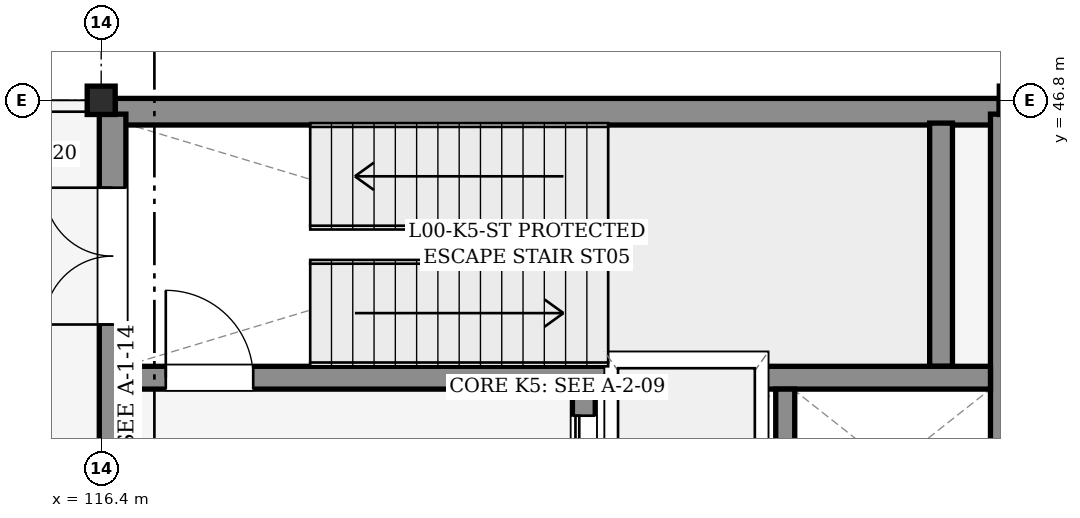
"""IFC4 building model, lengths in metres.
Left out: names, types, materials, properties, quantities, classifications, styles, units other than length and angle.
Written with IfcOpenShell. Run it as: python <this file> out.ifc"""

import sys

from ifc_helpers import new_model, si_unit, direction, frame, frame_2d, origin, origin_2d, place, context, subcontext, project, spatial, rectangle, i_section, extrude, element, fill, save


model = new_model("IFC4")
c1 = context("Model", 3, precision=1e-05, world=origin(), true_north=direction((0.0, 1.0)))
c2 = subcontext(c1, "Body", "Model", "MODEL_VIEW")
j1 = project(units=[si_unit("LENGTHUNIT", "METRE"), si_unit("PLANEANGLEUNIT", "RADIAN")], contexts=[c1])
p1 = place(None, origin())
s1 = spatial("IfcSite", under=j1, at=p1, CompositionType="ELEMENT")
p2 = place(p1, origin())
s2 = spatial("IfcBuilding", under=s1, at=p2, CompositionType="ELEMENT")
p3 = place(p2, origin())
s3 = spatial("IfcBuildingStorey", under=s2, at=p3, CompositionType="ELEMENT", Elevation=0.0)
for number, where, z_axis, x_axis in (
    (1, (116.4, 46.8, 0.0), (0.0, 0.0, 1.0), (1.0, 0.0, 0.0)),
    (2, (128.4, 46.8, 0.0), (0.0, 0.0, 1.0), (1.0, 0.0, 0.0)),
):
    element("IfcColumn", number, at=place(p3, frame(where, z_axis=z_axis, x_axis=x_axis)), inside=s3, PredefinedType="COLUMN", context=c2, shape_type="SweptSolid", body=[
        extrude(i_section(OverallWidth=0.373, OverallDepth=0.368, WebThickness=0.014, FlangeThickness=0.024, FilletRadius=0.015, at=origin_2d()), origin(), (0.0, 0.0, 1.0), 5.4),
    ])
p4 = place(p3, frame((116.584, 46.65, 0.0), z_axis=(0.0, 0.0, 1.0), x_axis=(1.0, 0.0, 0.0)))
e3 = element("IfcWall", 3, at=p4, inside=s3, PredefinedType="SHEAR", context=c2, shape_type="SweptSolid", body=[
    extrude(rectangle(XDim=11.631, YDim=0.35, at=frame_2d((5.815, 0.0))), origin(), (0.0, 0.0, 1.0), 5.18),
])
p5 = place(p3, frame((116.55, 38.582, 0.0), z_axis=(0.0, 0.0, 1.0), x_axis=(0.0, 1.0, 0.0)))
e4 = element("IfcWall", 4, at=p5, inside=s3, PredefinedType="SHEAR", context=c2, shape_type="SweptSolid", body=[
    extrude(rectangle(XDim=8.036, YDim=0.35, at=frame_2d((4.018, 0.0))), origin(), (0.0, 0.0, 1.0), 5.18),
])
p6 = place(p5, frame((5.268, 0.0, 0.0)))
e5 = element("IfcOpeningElement", 5, at=p6, cuts=e4, PredefinedType="OPENING", context=c2, shape_type="SweptSolid", body=[
    extrude(rectangle(XDim=1.8, YDim=2.2, at=frame_2d((0.9, 1.1))), frame((0.0, 0.185, 0.0), z_axis=(0.0, -1.0, 0.0), x_axis=(1.0, 0.0, 0.0)), (0.0, 0.0, 1.0), 0.37),
])
p7 = place(p3, frame((128.25, 38.582, 0.0), z_axis=(0.0, 0.0, 1.0), x_axis=(0.0, 1.0, 0.0)))
e6 = element("IfcWall", 6, at=p7, inside=s3, PredefinedType="SHEAR", context=c2, shape_type="SweptSolid", body=[
    extrude(rectangle(XDim=8.036, YDim=0.3, at=frame_2d((4.018, 0.0))), origin(), (0.0, 0.0, 1.0), 5.18),
])
p8 = place(p3, frame((127.45, 43.3, 0.0), z_axis=(0.0, 0.0, 1.0), x_axis=(0.0, 1.0, 0.0)))
e7 = element("IfcWall", 7, at=p8, inside=s3, PredefinedType="SHEAR", context=c2, shape_type="SweptSolid", body=[
    extrude(rectangle(XDim=3.2, YDim=0.3, at=frame_2d((1.6, 0.0))), origin(), (0.0, 0.0, 1.0), 5.18),
])
p9 = place(p3, frame((116.7, 43.15, 0.0), z_axis=(0.0, 0.0, 1.0), x_axis=(1.0, 0.0, 0.0)))
e8 = element("IfcWall", 8, at=p9, inside=s3, PredefinedType="SHEAR", context=c2, shape_type="SweptSolid", body=[
    extrude(rectangle(XDim=11.4, YDim=0.3, at=frame_2d((5.7, 0.0))), origin(), (0.0, 0.0, 1.0), 5.18),
])
p10 = place(p9, frame((0.55, 0.0, 0.0)))
e9 = element("IfcOpeningElement", 9, at=p10, cuts=e8, PredefinedType="OPENING", context=c2, shape_type="SweptSolid", body=[
    extrude(rectangle(XDim=1.15, YDim=2.15, at=frame_2d((0.575, 1.075))), frame((0.0, 0.16, 0.0), z_axis=(0.0, -1.0, 0.0), x_axis=(1.0, 0.0, 0.0)), (0.0, 0.0, 1.0), 0.32),
])
p11 = place(p3, frame((122.75, 40.85, 0.0), z_axis=(0.0, 0.0, 1.0), x_axis=(0.0, 1.0, 0.0)))
e10 = element("IfcWall", 10, at=p11, inside=s3, PredefinedType="SHEAR", context=c2, shape_type="SweptSolid", body=[
    extrude(rectangle(XDim=2.15, YDim=0.3, at=frame_2d((1.075, 0.0))), origin(), (0.0, 0.0, 1.0), 5.18),
])
p12 = place(p11, frame((0.5, 0.0, 0.0)))
e11 = element("IfcOpeningElement", 11, at=p12, cuts=e10, PredefinedType="OPENING", context=c2, shape_type="SweptSolid", body=[
    extrude(rectangle(XDim=1.3, YDim=2.3, at=frame_2d((0.65, 1.15))), frame((0.0, 0.16, 0.0), z_axis=(0.0, -1.0, 0.0), x_axis=(1.0, 0.0, 0.0)), (0.0, 0.0, 1.0), 0.32),
])
p13 = place(p3, frame((125.4, 40.95, 0.0), z_axis=(0.0, 0.0, 1.0), x_axis=(0.0, 1.0, 0.0)))
e12 = element("IfcWall", 12, at=p13, inside=s3, PredefinedType="PARTITIONING", context=c2, shape_type="SweptSolid", body=[
    extrude(rectangle(XDim=2.05, YDim=0.25, at=frame_2d((1.025, 0.0))), origin(), (0.0, 0.0, 1.0), 4.325),
])
p14 = place(p6, origin())
e13 = element("IfcDoor", 13, at=p14, inside=s3, OperationType="DOUBLE_DOOR_SINGLE_SWING", PredefinedType="DOOR", context=c2, shape_type="SweptSolid", body=[
    extrude(rectangle(XDim=1.8, YDim=2.2, at=frame_2d((0.9, 1.1))), frame((0.0, 0.025, 0.0), z_axis=(0.0, -1.0, 0.0), x_axis=(1.0, 0.0, 0.0)), (0.0, 0.0, 1.0), 0.05),
])
fill(e5, e13)
p15 = place(p10, origin())
e14 = element("IfcDoor", 14, at=p15, inside=s3, OperationType="SINGLE_SWING_LEFT", PredefinedType="DOOR", context=c2, shape_type="SweptSolid", body=[
    extrude(rectangle(XDim=1.15, YDim=2.15, at=frame_2d((0.575, 1.075))), frame((0.0, 0.025, 0.0), z_axis=(0.0, -1.0, 0.0), x_axis=(1.0, 0.0, 0.0)), (0.0, 0.0, 1.0), 0.05),
])
fill(e9, e14)
p16 = place(p12, origin())
e15 = element("IfcDoor", 15, at=p16, inside=s3, OperationType="SLIDING_TO_LEFT", PredefinedType="DOOR", context=c2, shape_type="SweptSolid", body=[
    extrude(rectangle(XDim=1.3, YDim=2.3, at=frame_2d((0.65, 1.15))), frame((0.0, 0.025, 0.0), z_axis=(0.0, -1.0, 0.0), x_axis=(1.0, 0.0, 0.0)), (0.0, 0.0, 1.0), 0.05),
])
fill(e11, e15)
save(model, sys.argv[1])
